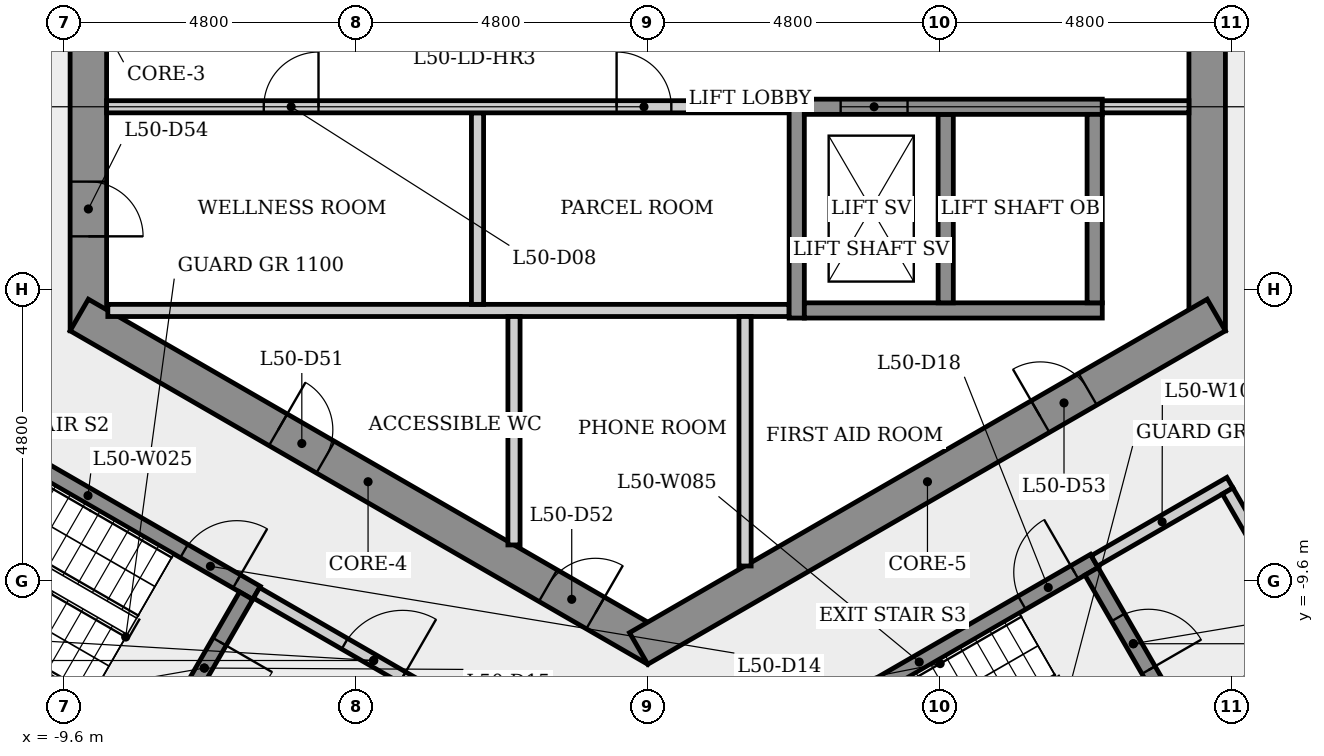
"""IFC4 building model, lengths in metres.
Left out: names, types, materials, properties, quantities, classifications, styles, units other than length and angle.
Written with IfcOpenShell. Run it as: python <this file> out.ifc"""

import sys

from ifc_helpers import new_model, si_unit, direction, frame, frame_2d, origin, place, context, subcontext, project, spatial, rectangle, extrude, element, fill, save


model = new_model("IFC4")
c1 = context("Model", 3, precision=1e-05, world=origin(), true_north=direction((0.0, 1.0)))
c2 = subcontext(c1, "Body", "Model", "MODEL_VIEW")
j1 = project(units=[si_unit("LENGTHUNIT", "METRE"), si_unit("PLANEANGLEUNIT", "RADIAN")], contexts=[c1])
p1 = place(None, origin())
s1 = spatial("IfcSite", under=j1, at=p1, CompositionType="ELEMENT")
p2 = place(p1, origin())
s2 = spatial("IfcBuilding", under=s1, at=p2, CompositionType="ELEMENT")
p3 = place(p2, frame((0.0, 0.0, 186.7)))
s3 = spatial("IfcBuildingStorey", under=s2, at=p3, CompositionType="ELEMENT", Elevation=186.7)
p4 = place(p3, frame((9.2, -5.485, 0.0), z_axis=(0.0, 0.0, 1.0), x_axis=(0.0, 1.0, 0.0)))
e1 = element("IfcWall", 1, at=p4, inside=s3, PredefinedType="SHEAR", context=c2, shape_type="SweptSolid", body=[
    extrude(rectangle(XDim=10.97, YDim=0.6, at=frame_2d((5.485, 0.0))), origin(), (0.0, 0.0, 1.0), 4.0),
])
p5 = place(p4, frame((4.685, 0.0, 0.0)))
e2 = element("IfcOpeningElement", 2, at=p5, cuts=e1, PredefinedType="OPENING", context=c2, shape_type="SweptSolid", body=[
    extrude(rectangle(XDim=1.6, YDim=2.1, at=frame_2d((0.8, 1.05))), frame((0.0, 0.31, 0.0), z_axis=(0.0, -1.0, 0.0), x_axis=(1.0, 0.0, 0.0)), (0.0, 0.0, 1.0), 0.62),
])
p6 = place(p3, frame((-9.2, 5.485, 0.0), z_axis=(0.0, 0.0, 1.0), x_axis=(0.0, -1.0, 0.0)))
e3 = element("IfcWall", 3, at=p6, inside=s3, PredefinedType="SHEAR", context=c2, shape_type="SweptSolid", body=[
    extrude(rectangle(XDim=10.97, YDim=0.6, at=frame_2d((5.485, 0.0))), origin(), (0.0, 0.0, 1.0), 4.0),
])
p7 = place(p6, frame((8.516, 0.0, 0.0)))
e4 = element("IfcOpeningElement", 4, at=p7, cuts=e3, PredefinedType="OPENING", context=c2, shape_type="SweptSolid", body=[
    extrude(rectangle(XDim=0.9, YDim=2.1, at=frame_2d((0.45, 1.05))), frame((0.0, 0.31, 0.0), z_axis=(0.0, -1.0, 0.0), x_axis=(1.0, 0.0, 0.0)), (0.0, 0.0, 1.0), 0.62),
])
p8 = place(p6, frame((4.685, 0.0, 0.0)))
e5 = element("IfcOpeningElement", 5, at=p8, cuts=e3, PredefinedType="OPENING", context=c2, shape_type="SweptSolid", body=[
    extrude(rectangle(XDim=1.6, YDim=2.1, at=frame_2d((0.8, 1.05))), frame((0.0, 0.31, 0.0), z_axis=(0.0, -1.0, 0.0), x_axis=(1.0, 0.0, 0.0)), (0.0, 0.0, 1.0), 0.62),
])
p9 = place(p3, frame((-9.35, -5.225, 0.0), z_axis=(0.0, 0.0, 1.0), x_axis=(0.866023993627, -0.500002442456, 0.0)))
e6 = element("IfcWall", 6, at=p9, inside=s3, PredefinedType="SHEAR", context=c2, shape_type="SweptSolid", body=[
    extrude(rectangle(XDim=10.97, YDim=0.6, at=frame_2d((5.485, 0.0))), origin(), (0.0, 0.0, 1.0), 4.0),
])
p10 = place(p9, frame((3.777, 0.0, 0.0)))
e7 = element("IfcOpeningElement", 7, at=p10, cuts=e6, PredefinedType="OPENING", context=c2, shape_type="SweptSolid", body=[
    extrude(rectangle(XDim=0.9, YDim=2.1, at=frame_2d((0.45, 1.05))), frame((0.0, 0.31, 0.0), z_axis=(0.0, -1.0, 0.0), x_axis=(1.0, 0.0, 0.0)), (0.0, 0.0, 1.0), 0.62),
])
p11 = place(p9, frame((8.903, 0.0, 0.0)))
e8 = element("IfcOpeningElement", 8, at=p11, cuts=e6, PredefinedType="OPENING", context=c2, shape_type="SweptSolid", body=[
    extrude(rectangle(XDim=0.9, YDim=2.1, at=frame_2d((0.45, 1.05))), frame((0.0, 0.31, 0.0), z_axis=(0.0, -1.0, 0.0), x_axis=(1.0, 0.0, 0.0)), (0.0, 0.0, 1.0), 0.62),
])
p12 = place(p3, frame((-0.15, -10.71, 0.0), z_axis=(0.0, 0.0, 1.0), x_axis=(0.866023993627, 0.500002442456, 0.0)))
e9 = element("IfcWall", 9, at=p12, inside=s3, PredefinedType="SHEAR", context=c2, shape_type="SweptSolid", body=[
    extrude(rectangle(XDim=10.97, YDim=0.6, at=frame_2d((5.485, 0.0))), origin(), (0.0, 0.0, 1.0), 4.0),
])
p13 = place(p12, frame((7.628, 0.0, 0.0)))
e10 = element("IfcOpeningElement", 10, at=p13, cuts=e9, PredefinedType="OPENING", context=c2, shape_type="SweptSolid", body=[
    extrude(rectangle(XDim=0.9, YDim=2.1, at=frame_2d((0.45, 1.05))), frame((0.0, 0.31, 0.0), z_axis=(0.0, -1.0, 0.0), x_axis=(1.0, 0.0, 0.0)), (0.0, 0.0, 1.0), 0.62),
])
p14 = place(p3, frame((-11.977, -6.595, 0.0), z_axis=(0.0, 0.0, 1.0), x_axis=(0.866025499775, -0.499999833739, 0.0)))
e11 = element("IfcWall", 11, at=p14, inside=s3, PredefinedType="SHEAR", context=c2, shape_type="SweptSolid", body=[
    extrude(rectangle(XDim=6.4, YDim=0.25, at=frame_2d((3.2, 0.0))), origin(), (0.0, 0.0, 1.0), 3.6),
])
p15 = place(p14, frame((5.025, 0.0, 0.0)))
e12 = element("IfcOpeningElement", 12, at=p15, cuts=e11, PredefinedType="OPENING", context=c2, shape_type="SweptSolid", body=[
    extrude(rectangle(XDim=1.0, YDim=2.1, at=frame_2d((0.5, 1.05))), frame((0.0, 0.135, 0.0), z_axis=(0.0, -1.0, 0.0), x_axis=(1.0, 0.0, 0.0)), (0.0, 0.0, 1.0), 0.27),
])
p16 = place(p3, frame((-8.88, -5.15, 0.0), z_axis=(0.0, 0.0, 1.0), x_axis=(1.0, 0.0, 0.0)))
e13 = element("IfcWall", 13, at=p16, inside=s3, PredefinedType="PARTITIONING", context=c2, shape_type="SweptSolid", body=[
    extrude(rectangle(XDim=11.205, YDim=0.2, at=frame_2d((5.603, 0.0))), origin(), (0.0, 0.0, 1.0), 3.6),
])
p17 = place(p3, frame((-7.935, -12.393, 0.0), z_axis=(0.0, 0.0, 1.0), x_axis=(-0.866025499775, 0.499999833739, 0.0)))
e14 = element("IfcWall", 14, at=p17, inside=s3, PredefinedType="SHEAR", context=c2, shape_type="SweptSolid", body=[
    extrude(rectangle(XDim=6.4, YDim=0.25, at=frame_2d((3.2, 0.0))), origin(), (0.0, 0.0, 1.0), 3.6),
])
p18 = place(p3, frame((-6.605, -9.841, 0.0), z_axis=(0.0, 0.0, 1.0), x_axis=(-0.499996545922, -0.866027397988, 0.0)))
e15 = element("IfcWall", 15, at=p18, inside=s3, PredefinedType="SHEAR", context=c2, shape_type="SweptSolid", body=[
    extrude(rectangle(XDim=2.75, YDim=0.25, at=frame_2d((1.375, 0.0))), origin(), (0.0, 0.0, 1.0), 3.6),
])
p19 = place(p18, frame((0.875, 0.0, 0.0)))
e16 = element("IfcOpeningElement", 16, at=p19, cuts=e15, PredefinedType="OPENING", context=c2, shape_type="SweptSolid", body=[
    extrude(rectangle(XDim=1.0, YDim=2.1, at=frame_2d((0.5, 1.05))), frame((0.0, 0.135, 0.0), z_axis=(0.0, -1.0, 0.0), x_axis=(1.0, 0.0, 0.0)), (0.0, 0.0, 1.0), 0.27),
])
p20 = place(p3, frame((-6.435, -9.795, 0.0), z_axis=(0.0, 0.0, 1.0), x_axis=(0.866012907634, -0.500021643343, 0.0)))
e17 = element("IfcWall", 17, at=p20, inside=s3, PredefinedType="PARTITIONING", context=c2, shape_type="SweptSolid", body=[
    extrude(rectangle(XDim=4.45, YDim=0.2, at=frame_2d((2.225, 0.0))), origin(), (0.0, 0.0, 1.0), 3.6),
])
p21 = place(p20, frame((1.675, 0.0, 0.0)))
e18 = element("IfcOpeningElement", 18, at=p21, cuts=e17, PredefinedType="OPENING", context=c2, shape_type="SweptSolid", body=[
    extrude(rectangle(XDim=1.1, YDim=2.1, at=frame_2d((0.55, 1.05))), frame((0.0, 0.11, 0.0), z_axis=(0.0, -1.0, 0.0), x_axis=(1.0, 0.0, 0.0)), (0.0, 0.0, 1.0), 0.22),
])
p22 = place(p3, frame((-2.8, -1.9, 0.0), z_axis=(0.0, 0.0, 1.0), x_axis=(0.0, -1.0, 0.0)))
e19 = element("IfcWall", 19, at=p22, inside=s3, PredefinedType="PARTITIONING", context=c2, shape_type="SweptSolid", body=[
    extrude(rectangle(XDim=3.15, YDim=0.2, at=frame_2d((1.575, 0.0))), origin(), (0.0, 0.0, 1.0), 3.6),
])
p23 = place(p3, frame((-8.9, -1.8, 0.0), z_axis=(0.0, 0.0, 1.0), x_axis=(1.0, 0.0, 0.0)))
e20 = element("IfcWall", 20, at=p23, inside=s3, PredefinedType="PARTITIONING", context=c2, shape_type="SweptSolid", body=[
    extrude(rectangle(XDim=11.225, YDim=0.2, at=frame_2d((5.613, 0.0))), origin(), (0.0, 0.0, 1.0), 3.6),
])
p24 = place(p23, frame((2.585, 0.0, 0.0)))
e21 = element("IfcOpeningElement", 21, at=p24, cuts=e20, PredefinedType="OPENING", context=c2, shape_type="SweptSolid", body=[
    extrude(rectangle(XDim=0.9, YDim=2.1, at=frame_2d((0.45, 1.05))), frame((0.0, 0.11, 0.0), z_axis=(0.0, -1.0, 0.0), x_axis=(1.0, 0.0, 0.0)), (0.0, 0.0, 1.0), 0.22),
])
p25 = place(p23, frame((8.387, 0.0, 0.0)))
e22 = element("IfcOpeningElement", 22, at=p25, cuts=e20, PredefinedType="OPENING", context=c2, shape_type="SweptSolid", body=[
    extrude(rectangle(XDim=0.9, YDim=2.1, at=frame_2d((0.45, 1.05))), frame((0.0, 0.11, 0.0), z_axis=(0.0, -1.0, 0.0), x_axis=(1.0, 0.0, 0.0)), (0.0, 0.0, 1.0), 0.22),
])
p26 = place(p3, frame((-2.2, -5.25, 0.0), z_axis=(0.0, 0.0, 1.0), x_axis=(0.0, -1.0, 0.0)))
e23 = element("IfcWall", 23, at=p26, inside=s3, PredefinedType="PARTITIONING", context=c2, shape_type="SweptSolid", body=[
    extrude(rectangle(XDim=3.757, YDim=0.2, at=frame_2d((1.878, 0.0))), origin(), (0.0, 0.0, 1.0), 3.6),
])
p27 = place(p3, frame((1.6, -5.25, 0.0), z_axis=(0.0, 0.0, 1.0), x_axis=(0.0, -1.0, 0.0)))
e24 = element("IfcWall", 24, at=p27, inside=s3, PredefinedType="PARTITIONING", context=c2, shape_type="SweptSolid", body=[
    extrude(rectangle(XDim=4.103, YDim=0.2, at=frame_2d((2.052, 0.0))), origin(), (0.0, 0.0, 1.0), 3.6),
])
p28 = place(p3, frame((1.585, -12.595, 0.0), z_axis=(0.0, 0.0, 1.0), x_axis=(0.866036417653, 0.499980922934, 0.0)))
e25 = element("IfcWall", 25, at=p28, inside=s3, PredefinedType="SHEAR", context=c2, shape_type="SweptSolid", body=[
    extrude(rectangle(XDim=6.65, YDim=0.25, at=frame_2d((3.325, 0.0))), origin(), (0.0, 0.0, 1.0), 3.6),
])
p29 = place(p28, frame((5.275, 0.0, 0.0)))
e26 = element("IfcOpeningElement", 26, at=p29, cuts=e25, PredefinedType="OPENING", context=c2, shape_type="SweptSolid", body=[
    extrude(rectangle(XDim=1.0, YDim=2.1, at=frame_2d((0.5, 1.05))), frame((0.0, 0.135, 0.0), z_axis=(0.0, -1.0, 0.0), x_axis=(1.0, 0.0, 0.0)), (0.0, 0.0, 1.0), 0.27),
])
p30 = place(p3, frame((2.45, -5.275, 0.0), z_axis=(0.0, 0.0, 1.0), x_axis=(0.0, 1.0, 0.0)))
e27 = element("IfcWall", 27, at=p30, inside=s3, PredefinedType="SHEAR", context=c2, shape_type="SweptSolid", body=[
    extrude(rectangle(XDim=3.6, YDim=0.25, at=frame_2d((1.8, 0.0))), origin(), (0.0, 0.0, 1.0), 3.6),
])
p31 = place(p3, frame((2.575, -5.15, 0.0), z_axis=(0.0, 0.0, 1.0), x_axis=(1.0, 0.0, 0.0)))
e28 = element("IfcWall", 28, at=p31, inside=s3, PredefinedType="SHEAR", context=c2, shape_type="SweptSolid", body=[
    extrude(rectangle(XDim=4.9, YDim=0.25, at=frame_2d((2.45, 0.0))), origin(), (0.0, 0.0, 1.0), 3.6),
])
p32 = place(p3, frame((4.9, -1.925, 0.0), z_axis=(0.0, 0.0, 1.0), x_axis=(0.0, -1.0, 0.0)))
e29 = element("IfcWall", 29, at=p32, inside=s3, PredefinedType="SHEAR", context=c2, shape_type="SweptSolid", body=[
    extrude(rectangle(XDim=3.1, YDim=0.25, at=frame_2d((1.55, 0.0))), origin(), (0.0, 0.0, 1.0), 4.0),
])
p33 = place(p3, frame((2.575, -1.8, 0.0), z_axis=(0.0, 0.0, 1.0), x_axis=(1.0, 0.0, 0.0)))
e30 = element("IfcWall", 30, at=p33, inside=s3, PredefinedType="SHEAR", context=c2, shape_type="SweptSolid", body=[
    extrude(rectangle(XDim=4.9, YDim=0.25, at=frame_2d((2.45, 0.0))), origin(), (0.0, 0.0, 1.0), 3.6),
])
p34 = place(p33, frame((0.597, 0.0, 0.0)))
e31 = element("IfcOpeningElement", 31, at=p34, cuts=e30, PredefinedType="OPENING", context=c2, shape_type="SweptSolid", body=[
    extrude(rectangle(XDim=1.1, YDim=2.1, at=frame_2d((0.55, 1.05))), frame((0.0, 0.135, 0.0), z_axis=(0.0, -1.0, 0.0), x_axis=(1.0, 0.0, 0.0)), (0.0, 0.0, 1.0), 0.27),
])
p35 = place(p3, frame((7.298, -9.441, 0.0), z_axis=(0.0, 0.0, 1.0), x_axis=(0.500034990121, -0.866005201286, 0.0)))
e32 = element("IfcWall", 32, at=p35, inside=s3, PredefinedType="SHEAR", context=c2, shape_type="SweptSolid", body=[
    extrude(rectangle(XDim=2.75, YDim=0.25, at=frame_2d((1.375, 0.0))), origin(), (0.0, 0.0, 1.0), 3.6),
])
p36 = place(p35, frame((0.875, 0.0, 0.0)))
e33 = element("IfcOpeningElement", 33, at=p36, cuts=e32, PredefinedType="OPENING", context=c2, shape_type="SweptSolid", body=[
    extrude(rectangle(XDim=1.0, YDim=2.1, at=frame_2d((0.5, 1.05))), frame((0.0, 0.135, 0.0), z_axis=(0.0, -1.0, 0.0), x_axis=(1.0, 0.0, 0.0)), (0.0, 0.0, 1.0), 0.27),
])
p37 = place(p3, frame((7.344, -9.27, 0.0), z_axis=(0.0, 0.0, 1.0), x_axis=(0.866005588531, 0.500034319456, 0.0)))
e34 = element("IfcWall", 34, at=p37, inside=s3, PredefinedType="PARTITIONING", context=c2, shape_type="SweptSolid", body=[
    extrude(rectangle(XDim=2.575, YDim=0.2, at=frame_2d((1.288, 0.0))), origin(), (0.0, 0.0, 1.0), 3.6),
])
p38 = place(p3, frame((7.35, -1.925, 0.0), z_axis=(0.0, 0.0, 1.0), x_axis=(0.0, -1.0, 0.0)))
e35 = element("IfcWall", 35, at=p38, inside=s3, PredefinedType="SHEAR", context=c2, shape_type="SweptSolid", body=[
    extrude(rectangle(XDim=3.1, YDim=0.25, at=frame_2d((1.55, 0.0))), origin(), (0.0, 0.0, 1.0), 4.0),
])
p39 = place(p3, frame((8.9, -1.8, 0.0), z_axis=(0.0, 0.0, 1.0), x_axis=(-1.0, 0.0, 0.0)))
e36 = element("IfcWall", 36, at=p39, inside=s3, PredefinedType="PARTITIONING", context=c2, shape_type="SweptSolid", body=[
    extrude(rectangle(XDim=1.425, YDim=0.2, at=frame_2d((0.712, 0.0))), origin(), (0.0, 0.0, 1.0), 3.6),
])
p40 = place(p3, frame((9.537, -8.119, 0.0), z_axis=(0.0, 0.0, 1.0), x_axis=(0.499990139034, -0.866031096941, 0.0)))
e37 = element("IfcWall", 37, at=p40, inside=s3, PredefinedType="PARTITIONING", context=c2, shape_type="SweptSolid", body=[
    extrude(rectangle(XDim=3.0, YDim=0.2, at=frame_2d((1.5, 0.0))), origin(), (0.0, 0.0, 1.0), 3.6),
])
p41 = place(p40, frame((0.935, 0.0, 0.0)))
e38 = element("IfcOpeningElement", 38, at=p41, cuts=e37, PredefinedType="OPENING", context=c2, shape_type="SweptSolid", body=[
    extrude(rectangle(XDim=1.0, YDim=2.1, at=frame_2d((0.5, 1.05))), frame((0.0, 0.11, 0.0), z_axis=(0.0, -1.0, 0.0), x_axis=(1.0, 0.0, 0.0)), (0.0, 0.0, 1.0), 0.22),
])
p42 = place(p3, frame((10.901, -10.681, 0.0), z_axis=(0.0, 0.0, 1.0), x_axis=(-0.866007538022, -0.500030943131, 0.0)))
e39 = element("IfcWall", 39, at=p42, inside=s3, PredefinedType="PLUMBINGWALL", context=c2, shape_type="SweptSolid", body=[
    extrude(rectangle(XDim=2.375, YDim=0.2, at=frame_2d((1.188, 0.0))), origin(), (0.0, 0.0, 1.0), 3.6),
])
p43 = place(p34, origin())
e40 = element("IfcDoor", 40, at=p43, inside=s3, OperationType="SLIDING_TO_LEFT", PredefinedType="DOOR", context=c2, shape_type="SweptSolid", body=[
    extrude(rectangle(XDim=1.1, YDim=2.1, at=frame_2d((0.55, 1.05))), frame((0.0, 0.025, 0.0), z_axis=(0.0, -1.0, 0.0), x_axis=(1.0, 0.0, 0.0)), (0.0, 0.0, 1.0), 0.05),
])
fill(e31, e40)
p44 = place(p24, origin())
e41 = element("IfcDoor", 41, at=p44, inside=s3, OperationType="SINGLE_SWING_RIGHT", PredefinedType="DOOR", context=c2, shape_type="SweptSolid", body=[
    extrude(rectangle(XDim=0.9, YDim=2.1, at=frame_2d((0.45, 1.05))), frame((0.0, 0.025, 0.0), z_axis=(0.0, -1.0, 0.0), x_axis=(1.0, 0.0, 0.0)), (0.0, 0.0, 1.0), 0.05),
])
fill(e21, e41)
p45 = place(p25, origin())
e42 = element("IfcDoor", 42, at=p45, inside=s3, OperationType="SINGLE_SWING_LEFT", PredefinedType="DOOR", context=c2, shape_type="SweptSolid", body=[
    extrude(rectangle(XDim=0.9, YDim=2.1, at=frame_2d((0.45, 1.05))), frame((0.0, 0.025, 0.0), z_axis=(0.0, -1.0, 0.0), x_axis=(1.0, 0.0, 0.0)), (0.0, 0.0, 1.0), 0.05),
])
fill(e22, e42)
p46 = place(p15, origin())
e43 = element("IfcDoor", 43, at=p46, inside=s3, OperationType="SINGLE_SWING_RIGHT", PredefinedType="DOOR", context=c2, shape_type="SweptSolid", body=[
    extrude(rectangle(XDim=1.0, YDim=2.1, at=frame_2d((0.5, 1.05))), frame((0.0, 0.025, 0.0), z_axis=(0.0, -1.0, 0.0), x_axis=(1.0, 0.0, 0.0)), (0.0, 0.0, 1.0), 0.05),
])
fill(e12, e43)
p47 = place(p19, origin())
e44 = element("IfcDoor", 44, at=p47, inside=s3, OperationType="SINGLE_SWING_LEFT", PredefinedType="DOOR", context=c2, shape_type="SweptSolid", body=[
    extrude(rectangle(XDim=1.0, YDim=2.1, at=frame_2d((0.5, 1.05))), frame((0.0, 0.025, 0.0), z_axis=(0.0, -1.0, 0.0), x_axis=(1.0, 0.0, 0.0)), (0.0, 0.0, 1.0), 0.05),
])
fill(e16, e44)
p48 = place(p21, origin())
e45 = element("IfcDoor", 45, at=p48, inside=s3, OperationType="SINGLE_SWING_RIGHT", PredefinedType="DOOR", context=c2, shape_type="SweptSolid", body=[
    extrude(rectangle(XDim=1.1, YDim=2.1, at=frame_2d((0.55, 1.05))), frame((0.0, 0.025, 0.0), z_axis=(0.0, -1.0, 0.0), x_axis=(1.0, 0.0, 0.0)), (0.0, 0.0, 1.0), 0.05),
])
fill(e18, e45)
p49 = place(p29, origin())
e46 = element("IfcDoor", 46, at=p49, inside=s3, OperationType="SINGLE_SWING_RIGHT", PredefinedType="DOOR", context=c2, shape_type="SweptSolid", body=[
    extrude(rectangle(XDim=1.0, YDim=2.1, at=frame_2d((0.5, 1.05))), frame((0.0, 0.025, 0.0), z_axis=(0.0, -1.0, 0.0), x_axis=(1.0, 0.0, 0.0)), (0.0, 0.0, 1.0), 0.05),
])
fill(e26, e46)
p50 = place(p36, origin())
e47 = element("IfcDoor", 47, at=p50, inside=s3, OperationType="SINGLE_SWING_RIGHT", PredefinedType="DOOR", context=c2, shape_type="SweptSolid", body=[
    extrude(rectangle(XDim=1.0, YDim=2.1, at=frame_2d((0.5, 1.05))), frame((0.0, 0.025, 0.0), z_axis=(0.0, -1.0, 0.0), x_axis=(1.0, 0.0, 0.0)), (0.0, 0.0, 1.0), 0.05),
])
fill(e33, e47)
p51 = place(p10, origin())
e48 = element("IfcDoor", 48, at=p51, inside=s3, OperationType="SINGLE_SWING_LEFT", PredefinedType="DOOR", context=c2, shape_type="SweptSolid", body=[
    extrude(rectangle(XDim=0.9, YDim=2.1, at=frame_2d((0.45, 1.05))), frame((0.0, 0.025, 0.0), z_axis=(0.0, -1.0, 0.0), x_axis=(1.0, 0.0, 0.0)), (0.0, 0.0, 1.0), 0.05),
])
fill(e7, e48)
p52 = place(p11, origin())
e49 = element("IfcDoor", 49, at=p52, inside=s3, OperationType="SINGLE_SWING_RIGHT", PredefinedType="DOOR", context=c2, shape_type="SweptSolid", body=[
    extrude(rectangle(XDim=0.9, YDim=2.1, at=frame_2d((0.45, 1.05))), frame((0.0, 0.025, 0.0), z_axis=(0.0, -1.0, 0.0), x_axis=(1.0, 0.0, 0.0)), (0.0, 0.0, 1.0), 0.05),
])
fill(e8, e49)
p53 = place(p13, origin())
e50 = element("IfcDoor", 50, at=p53, inside=s3, OperationType="SINGLE_SWING_LEFT", PredefinedType="DOOR", context=c2, shape_type="SweptSolid", body=[
    extrude(rectangle(XDim=0.9, YDim=2.1, at=frame_2d((0.45, 1.05))), frame((0.0, 0.025, 0.0), z_axis=(0.0, -1.0, 0.0), x_axis=(1.0, 0.0, 0.0)), (0.0, 0.0, 1.0), 0.05),
])
fill(e10, e50)
p54 = place(p7, origin())
e51 = element("IfcDoor", 51, at=p54, inside=s3, OperationType="SINGLE_SWING_RIGHT", PredefinedType="DOOR", context=c2, shape_type="SweptSolid", body=[
    extrude(rectangle(XDim=0.9, YDim=2.1, at=frame_2d((0.45, 1.05))), frame((0.0, 0.025, 0.0), z_axis=(0.0, -1.0, 0.0), x_axis=(1.0, 0.0, 0.0)), (0.0, 0.0, 1.0), 0.05),
])
fill(e4, e51)
save(model, sys.argv[1])
